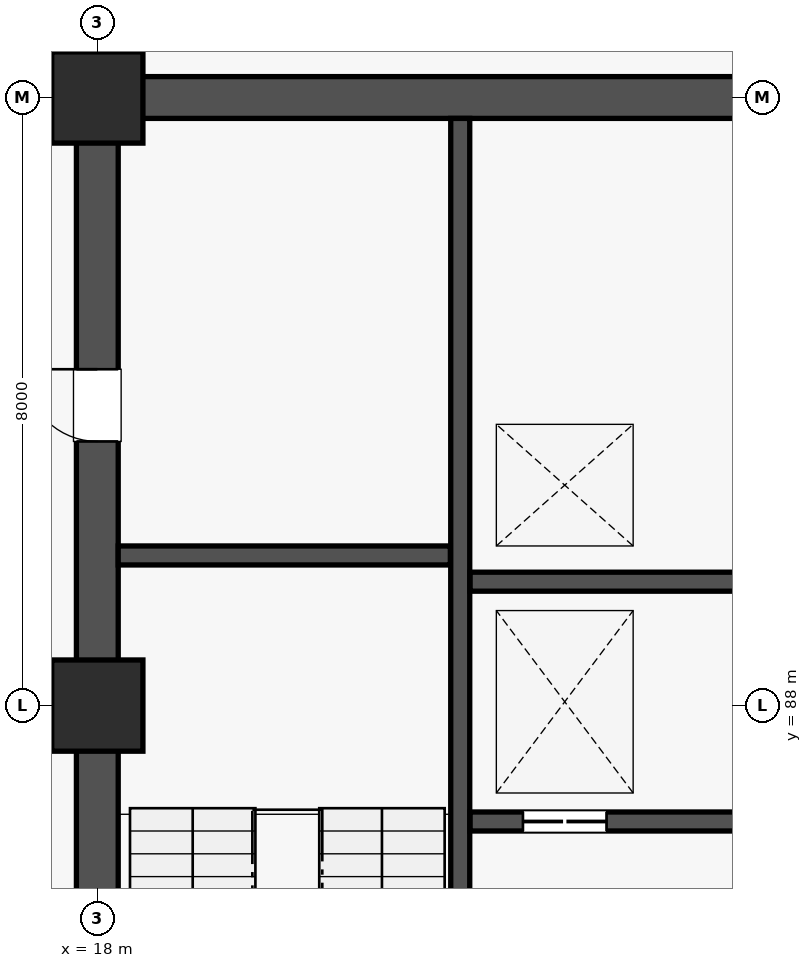
"""IFC4 building model, lengths in metres.
Left out: names, types, materials, properties, quantities, classifications, styles, units other than length and angle.
Written with IfcOpenShell. Run it as: python <this file> out.ifc"""

import sys

from ifc_helpers import new_model, si_unit, direction, frame, frame_2d, origin, origin_2d, place, context, subcontext, project, spatial, rectangle, extrude, element, fill, save


model = new_model("IFC4")
c1 = context("Model", 3, precision=1e-05, world=origin(), true_north=direction((0.0, 1.0)))
c2 = subcontext(c1, "Body", "Model", "MODEL_VIEW")
j1 = project(units=[si_unit("LENGTHUNIT", "METRE"), si_unit("PLANEANGLEUNIT", "RADIAN")], contexts=[c1])
p1 = place(None, origin())
s1 = spatial("IfcSite", under=j1, at=p1, CompositionType="ELEMENT")
p2 = place(p1, origin())
s2 = spatial("IfcBuilding", under=s1, at=p2, CompositionType="ELEMENT")
p3 = place(p2, frame((0.0, 0.0, -9.0)))
s3 = spatial("IfcBuildingStorey", under=s2, at=p3, CompositionType="ELEMENT", Elevation=-9.0)
for number, where, z_axis, x_axis in (
    (1, (18.0, 88.0, 0.0), (0.0, 0.0, 1.0), (1.0, 0.0, 0.0)),
    (2, (18.0, 96.0, 0.0), (0.0, 0.0, 1.0), (1.0, 0.0, 0.0)),
):
    element("IfcColumn", number, at=place(p3, frame(where, z_axis=z_axis, x_axis=x_axis)), inside=s3, PredefinedType="COLUMN", context=c2, shape_type="SweptSolid", body=[
        extrude(rectangle(XDim=1.2, YDim=1.2, at=origin_2d()), origin(), (0.0, 0.0, 1.0), 4.5),
    ])
p4 = place(p3, frame((18.275, 96.0, 0.0), z_axis=(0.0, 0.0, 1.0), x_axis=(1.0, 0.0, 0.0)))
e3 = element("IfcWall", 3, at=p4, inside=s3, PredefinedType="SHEAR", context=c2, shape_type="SweptSolid", body=[
    extrude(rectangle(XDim=8.45, YDim=0.55, at=frame_2d((4.225, 0.0))), origin(), (0.0, 0.0, 1.0), 4.2),
])
p5 = place(p3, frame((18.0, 80.275, 0.0), z_axis=(0.0, 0.0, 1.0), x_axis=(0.0, 1.0, 0.0)))
e4 = element("IfcWall", 4, at=p5, inside=s3, PredefinedType="SHEAR", context=c2, shape_type="SweptSolid", body=[
    extrude(rectangle(XDim=15.45, YDim=0.55, at=frame_2d((7.725, 0.0))), origin(), (0.0, 0.0, 1.0), 4.2),
])
p6 = place(p5, frame((11.2, 0.0, 0.0)))
e5 = element("IfcOpeningElement", 5, at=p6, cuts=e4, PredefinedType="OPENING", context=c2, shape_type="SweptSolid", body=[
    extrude(rectangle(XDim=0.95, YDim=2.1, at=frame_2d((0.475, 1.05))), frame((0.0, 0.287, 0.0), z_axis=(0.0, -1.0, 0.0), x_axis=(1.0, 0.0, 0.0)), (0.0, 0.0, 1.0), 0.574),
])
p7 = place(p3, frame((22.775, 80.275, 0.0), z_axis=(0.0, 0.0, 1.0), x_axis=(0.0, 1.0, 0.0)))
e6 = element("IfcWall", 6, at=p7, inside=s3, PredefinedType="SOLIDWALL", context=c2, shape_type="SweptSolid", body=[
    extrude(rectangle(XDim=15.45, YDim=0.25, at=frame_2d((7.725, 0.0))), origin(), (0.0, 0.0, 1.0), 4.2),
])
p8 = place(p7, frame((0.45, 0.0, 0.0)))
e7 = element("IfcOpeningElement", 7, at=p8, cuts=e6, PredefinedType="OPENING", context=c2, shape_type="SweptSolid", body=[
    extrude(rectangle(XDim=1.1, YDim=2.15, at=frame_2d((0.55, 1.075))), frame((0.0, 0.137, 0.0), z_axis=(0.0, -1.0, 0.0), x_axis=(1.0, 0.0, 0.0)), (0.0, 0.0, 1.0), 0.274),
])
p9 = place(p3, frame((18.275, 89.975, 0.0), z_axis=(0.0, 0.0, 1.0), x_axis=(1.0, 0.0, 0.0)))
e8 = element("IfcWall", 8, at=p9, inside=s3, PredefinedType="SOLIDWALL", context=c2, shape_type="SweptSolid", body=[
    extrude(rectangle(XDim=4.37, YDim=0.25, at=frame_2d((2.185, 0.0))), origin(), (0.0, 0.0, 1.0), 4.2),
])
p10 = place(p3, frame((22.905, 86.475, 0.0), z_axis=(0.0, 0.0, 1.0), x_axis=(1.0, 0.0, 0.0)))
e9 = element("IfcWall", 9, at=p10, inside=s3, PredefinedType="SOLIDWALL", context=c2, shape_type="SweptSolid", body=[
    extrude(rectangle(XDim=3.82, YDim=0.25, at=frame_2d((1.91, 0.0))), origin(), (0.0, 0.0, 1.0), 4.2),
])
p11 = place(p10, frame((0.695, 0.0, 0.0)))
e10 = element("IfcOpeningElement", 10, at=p11, cuts=e9, PredefinedType="OPENING", context=c2, shape_type="SweptSolid", body=[
    extrude(rectangle(XDim=1.1, YDim=2.12, at=frame_2d((0.55, 1.06))), frame((0.0, 0.137, 0.0), z_axis=(0.0, -1.0, 0.0), x_axis=(1.0, 0.0, 0.0)), (0.0, 0.0, 1.0), 0.274),
])
p12 = place(p3, frame((22.905, 89.63, 0.0), z_axis=(0.0, 0.0, 1.0), x_axis=(1.0, 0.0, 0.0)))
e11 = element("IfcWall", 11, at=p12, inside=s3, PredefinedType="SOLIDWALL", context=c2, shape_type="SweptSolid", body=[
    extrude(rectangle(XDim=3.82, YDim=0.25, at=frame_2d((1.91, 0.0))), origin(), (0.0, 0.0, 1.0), 4.2),
])
p13 = place(p6, origin())
e12 = element("IfcDoor", 12, at=p13, inside=s3, OperationType="SINGLE_SWING_RIGHT", PredefinedType="DOOR", context=c2, shape_type="SweptSolid", body=[
    extrude(rectangle(XDim=0.95, YDim=2.1, at=frame_2d((0.475, 1.05))), frame((0.0, 0.025, 0.0), z_axis=(0.0, -1.0, 0.0), x_axis=(1.0, 0.0, 0.0)), (0.0, 0.0, 1.0), 0.05),
])
fill(e5, e12)
p14 = place(p11, origin())
e13 = element("IfcDoor", 13, at=p14, inside=s3, OperationType="DOUBLE_DOOR_SLIDING", PredefinedType="DOOR", context=c2, shape_type="SweptSolid", body=[
    extrude(rectangle(XDim=1.1, YDim=2.12, at=frame_2d((0.55, 1.06))), frame((0.0, 0.025, 0.0), z_axis=(0.0, -1.0, 0.0), x_axis=(1.0, 0.0, 0.0)), (0.0, 0.0, 1.0), 0.05),
])
fill(e10, e13)
save(model, sys.argv[1])
